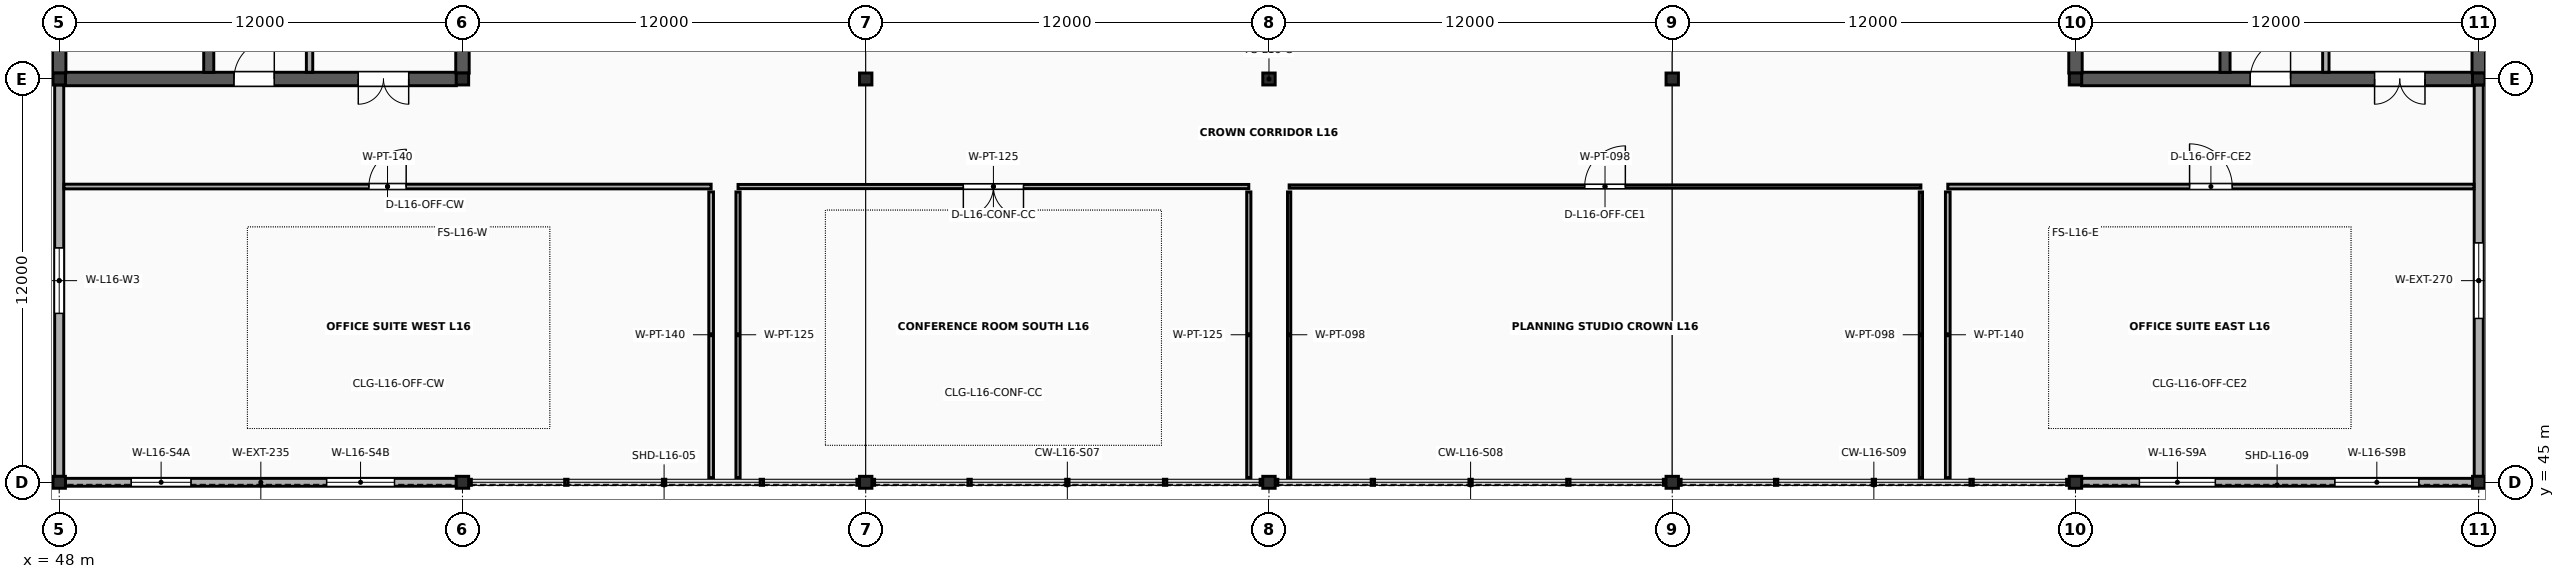
"""IFC4 building model, lengths in metres.
Left out: names, types, materials, properties, quantities, classifications, styles, units other than length and angle.
Written with IfcOpenShell. Run it as: python <this file> out.ifc"""

import sys

from ifc_helpers import new_model, si_unit, direction, frame, frame_2d, origin, origin_2d, place, context, subcontext, project, spatial, rectangle, i_section, extrude, element, fill, save


model = new_model("IFC4")
c1 = context("Model", 3, precision=1e-05, world=origin(), true_north=direction((0.0, 1.0)))
c2 = subcontext(c1, "Body", "Model", "MODEL_VIEW")
j1 = project(units=[si_unit("LENGTHUNIT", "METRE"), si_unit("PLANEANGLEUNIT", "RADIAN")], contexts=[c1])
p1 = place(None, origin())
s1 = spatial("IfcSite", under=j1, at=p1, CompositionType="ELEMENT")
p2 = place(p1, origin())
s2 = spatial("IfcBuilding", under=s1, at=p2, CompositionType="ELEMENT")
p3 = place(p2, frame((0.0, 0.0, 65.6)))
s3 = spatial("IfcBuildingStorey", under=s2, at=p3, CompositionType="ELEMENT", Elevation=65.6)
for number, where, z_axis, x_axis in (
    (1, (48.0, 45.0, 0.0), (0.0, 0.0, 1.0), (1.0, 0.0, 0.0)),
    (2, (48.0, 57.0, 0.0), (0.0, 0.0, 1.0), (1.0, 0.0, 0.0)),
    (3, (60.0, 45.0, 0.0), (0.0, 0.0, 1.0), (1.0, 0.0, 0.0)),
    (4, (60.0, 57.0, 0.0), (0.0, 0.0, 1.0), (1.0, 0.0, 0.0)),
    (5, (72.0, 45.0, 0.0), (0.0, 0.0, 1.0), (1.0, 0.0, 0.0)),
    (6, (72.0, 57.0, 0.0), (0.0, 0.0, 1.0), (1.0, 0.0, 0.0)),
    (7, (84.0, 45.0, 0.0), (0.0, 0.0, 1.0), (1.0, 0.0, 0.0)),
    (8, (84.0, 57.0, 0.0), (0.0, 0.0, 1.0), (1.0, 0.0, 0.0)),
    (9, (96.0, 45.0, 0.0), (0.0, 0.0, 1.0), (1.0, 0.0, 0.0)),
    (10, (96.0, 57.0, 0.0), (0.0, 0.0, 1.0), (1.0, 0.0, 0.0)),
    (11, (108.0, 45.0, 0.0), (0.0, 0.0, 1.0), (1.0, 0.0, 0.0)),
    (12, (108.0, 57.0, 0.0), (0.0, 0.0, 1.0), (1.0, 0.0, 0.0)),
    (13, (120.0, 45.0, 0.0), (0.0, 0.0, 1.0), (1.0, 0.0, 0.0)),
    (14, (120.0, 57.0, 0.0), (0.0, 0.0, 1.0), (1.0, 0.0, 0.0)),
):
    element("IfcColumn", number, at=place(p3, frame(where, z_axis=z_axis, x_axis=x_axis)), inside=s3, PredefinedType="COLUMN", context=c2, shape_type="SweptSolid", body=[
        extrude(i_section(OverallWidth=0.369, OverallDepth=0.356, WebThickness=0.011, FlangeThickness=0.018, FilletRadius=0.018, at=origin_2d()), origin(), (0.0, 0.0, 1.0), 4.0),
    ])
p4 = place(p3, frame((48.181, 57.0, 0.0), z_axis=(0.0, 0.0, 1.0), x_axis=(1.0, 0.0, 0.0)))
e15 = element("IfcWall", 15, at=p4, inside=s3, PredefinedType="SHEAR", context=c2, shape_type="SweptSolid", body=[
    extrude(rectangle(XDim=11.637, YDim=0.4, at=frame_2d((5.819, 0.0))), origin(), (0.0, 0.0, 1.0), 3.793),
])
p5 = place(p4, frame((5.019, 0.0, 0.0)))
e16 = element("IfcOpeningElement", 16, at=p5, cuts=e15, PredefinedType="OPENING", context=c2, shape_type="SweptSolid", body=[
    extrude(rectangle(XDim=1.2, YDim=2.2, at=frame_2d((0.6, 1.1))), frame((0.0, 0.215, 0.0), z_axis=(0.0, -1.0, 0.0), x_axis=(1.0, 0.0, 0.0)), (0.0, 0.0, 1.0), 0.43),
])
p6 = place(p4, frame((8.718, 0.0, 0.0)))
e17 = element("IfcOpeningElement", 17, at=p6, cuts=e15, PredefinedType="OPENING", context=c2, shape_type="SweptSolid", body=[
    extrude(rectangle(XDim=1.5, YDim=2.25, at=frame_2d((0.75, 1.125))), frame((0.0, 0.215, 0.0), z_axis=(0.0, -1.0, 0.0), x_axis=(1.0, 0.0, 0.0)), (0.0, 0.0, 1.0), 0.43),
])
for number, where, z_axis, x_axis in (
    (18, (48.0, 57.175, 0.0), (0.0, 0.0, 1.0), (0.0, 1.0, 0.0)),
    (19, (60.0, 57.175, 0.0), (0.0, 0.0, 1.0), (0.0, 1.0, 0.0)),
):
    element("IfcWall", number, at=place(p3, frame(where, z_axis=z_axis, x_axis=x_axis)), inside=s3, PredefinedType="SHEAR", context=c2, shape_type="SweptSolid", body=[
        extrude(rectangle(XDim=11.65, YDim=0.4, at=frame_2d((5.825, 0.0))), origin(), (0.0, 0.0, 1.0), 3.793),
    ])
p7 = place(p3, frame((52.45, 57.197, 0.0), z_axis=(0.0, 0.0, 1.0), x_axis=(0.0, 1.0, 0.0)))
e20 = element("IfcWall", 20, at=p7, inside=s3, PredefinedType="SHEAR", context=c2, shape_type="SweptSolid", body=[
    extrude(rectangle(XDim=11.606, YDim=0.3, at=frame_2d((5.803, 0.0))), origin(), (0.0, 0.0, 1.0), 3.793),
])
p8 = place(p7, frame((0.9, 0.0, 0.0)))
e21 = element("IfcOpeningElement", 21, at=p8, cuts=e20, PredefinedType="OPENING", context=c2, shape_type="SweptSolid", body=[
    extrude(rectangle(XDim=1.1, YDim=2.2, at=frame_2d((0.55, 1.1))), frame((0.0, 0.165, 0.0), z_axis=(0.0, -1.0, 0.0), x_axis=(1.0, 0.0, 0.0)), (0.0, 0.0, 1.0), 0.33),
])
p9 = place(p3, frame((55.45, 57.2, 0.0), z_axis=(0.0, 0.0, 1.0), x_axis=(0.0, 1.0, 0.0)))
e22 = element("IfcWall", 22, at=p9, inside=s3, PredefinedType="SOLIDWALL", context=c2, shape_type="SweptSolid", body=[
    extrude(rectangle(XDim=8.48, YDim=0.19, at=frame_2d((4.24, 0.0))), origin(), (0.0, 0.0, 1.0), 3.783),
])
p10 = place(p9, frame((3.6, 0.0, 0.0)))
e23 = element("IfcOpeningElement", 23, at=p10, cuts=e22, PredefinedType="OPENING", context=c2, shape_type="SweptSolid", body=[
    extrude(rectangle(XDim=1.04, YDim=2.18, at=frame_2d((0.52, 1.09))), frame((0.0, 0.11, 0.0), z_axis=(0.0, -1.0, 0.0), x_axis=(1.0, 0.0, 0.0)), (0.0, 0.0, 1.0), 0.22),
])
p11 = place(p3, frame((108.181, 57.0, 0.0), z_axis=(0.0, 0.0, 1.0), x_axis=(1.0, 0.0, 0.0)))
e24 = element("IfcWall", 24, at=p11, inside=s3, PredefinedType="SHEAR", context=c2, shape_type="SweptSolid", body=[
    extrude(rectangle(XDim=11.637, YDim=0.4, at=frame_2d((5.819, 0.0))), origin(), (0.0, 0.0, 1.0), 3.793),
])
p12 = place(p11, frame((5.019, 0.0, 0.0)))
e25 = element("IfcOpeningElement", 25, at=p12, cuts=e24, PredefinedType="OPENING", context=c2, shape_type="SweptSolid", body=[
    extrude(rectangle(XDim=1.2, YDim=2.2, at=frame_2d((0.6, 1.1))), frame((0.0, 0.215, 0.0), z_axis=(0.0, -1.0, 0.0), x_axis=(1.0, 0.0, 0.0)), (0.0, 0.0, 1.0), 0.43),
])
p13 = place(p11, frame((8.719, 0.0, 0.0)))
e26 = element("IfcOpeningElement", 26, at=p13, cuts=e24, PredefinedType="OPENING", context=c2, shape_type="SweptSolid", body=[
    extrude(rectangle(XDim=1.5, YDim=2.25, at=frame_2d((0.75, 1.125))), frame((0.0, 0.215, 0.0), z_axis=(0.0, -1.0, 0.0), x_axis=(1.0, 0.0, 0.0)), (0.0, 0.0, 1.0), 0.43),
])
for number, where, z_axis, x_axis in (
    (27, (108.0, 57.175, 0.0), (0.0, 0.0, 1.0), (0.0, 1.0, 0.0)),
    (28, (120.0, 57.175, 0.0), (0.0, 0.0, 1.0), (0.0, 1.0, 0.0)),
):
    element("IfcWall", number, at=place(p3, frame(where, z_axis=z_axis, x_axis=x_axis)), inside=s3, PredefinedType="SHEAR", context=c2, shape_type="SweptSolid", body=[
        extrude(rectangle(XDim=11.65, YDim=0.4, at=frame_2d((5.825, 0.0))), origin(), (0.0, 0.0, 1.0), 3.793),
    ])
p14 = place(p3, frame((112.45, 57.197, 0.0), z_axis=(0.0, 0.0, 1.0), x_axis=(0.0, 1.0, 0.0)))
e29 = element("IfcWall", 29, at=p14, inside=s3, PredefinedType="SHEAR", context=c2, shape_type="SweptSolid", body=[
    extrude(rectangle(XDim=11.606, YDim=0.3, at=frame_2d((5.803, 0.0))), origin(), (0.0, 0.0, 1.0), 3.793),
])
p15 = place(p14, frame((0.9, 0.0, 0.0)))
e30 = element("IfcOpeningElement", 30, at=p15, cuts=e29, PredefinedType="OPENING", context=c2, shape_type="SweptSolid", body=[
    extrude(rectangle(XDim=1.1, YDim=2.2, at=frame_2d((0.55, 1.1))), frame((0.0, 0.165, 0.0), z_axis=(0.0, -1.0, 0.0), x_axis=(1.0, 0.0, 0.0)), (0.0, 0.0, 1.0), 0.33),
])
p16 = place(p3, frame((115.45, 57.2, 0.0), z_axis=(0.0, 0.0, 1.0), x_axis=(0.0, 1.0, 0.0)))
e31 = element("IfcWall", 31, at=p16, inside=s3, PredefinedType="SOLIDWALL", context=c2, shape_type="SweptSolid", body=[
    extrude(rectangle(XDim=8.48, YDim=0.19, at=frame_2d((4.24, 0.0))), origin(), (0.0, 0.0, 1.0), 3.783),
])
p17 = place(p16, frame((3.6, 0.0, 0.0)))
e32 = element("IfcOpeningElement", 32, at=p17, cuts=e31, PredefinedType="OPENING", context=c2, shape_type="SweptSolid", body=[
    extrude(rectangle(XDim=1.04, YDim=2.18, at=frame_2d((0.52, 1.09))), frame((0.0, 0.11, 0.0), z_axis=(0.0, -1.0, 0.0), x_axis=(1.0, 0.0, 0.0)), (0.0, 0.0, 1.0), 0.22),
])
p18 = place(p3, frame((48.183, 45.0, 0.0), z_axis=(0.0, 0.0, 1.0), x_axis=(1.0, 0.0, 0.0)))
e33 = element("IfcWall", 33, at=p18, inside=s3, PredefinedType="SOLIDWALL", context=c2, shape_type="SweptSolid", body=[
    extrude(rectangle(XDim=11.635, YDim=0.235, at=frame_2d((5.817, 0.0))), origin(), (0.0, 0.0, 1.0), 3.246),
])
p19 = place(p18, frame((1.96, 0.0, 0.78)))
e34 = element("IfcOpeningElement", 34, at=p19, cuts=e33, PredefinedType="OPENING", context=c2, shape_type="SweptSolid", body=[
    extrude(rectangle(XDim=1.78, YDim=1.9, at=frame_2d((0.89, 0.95))), frame((0.0, 0.133, 0.0), z_axis=(0.0, -1.0, 0.0), x_axis=(1.0, 0.0, 0.0)), (0.0, 0.0, 1.0), 0.265),
])
p20 = place(p18, frame((7.775, 0.0, 0.78)))
e35 = element("IfcOpeningElement", 35, at=p20, cuts=e33, PredefinedType="OPENING", context=c2, shape_type="SweptSolid", body=[
    extrude(rectangle(XDim=2.02, YDim=1.9, at=frame_2d((1.01, 0.95))), frame((0.0, 0.133, 0.0), z_axis=(0.0, -1.0, 0.0), x_axis=(1.0, 0.0, 0.0)), (0.0, 0.0, 1.0), 0.265),
])
p21 = place(p3, frame((108.183, 45.0, 0.0), z_axis=(0.0, 0.0, 1.0), x_axis=(1.0, 0.0, 0.0)))
e36 = element("IfcWall", 36, at=p21, inside=s3, PredefinedType="SOLIDWALL", context=c2, shape_type="SweptSolid", body=[
    extrude(rectangle(XDim=11.635, YDim=0.235, at=frame_2d((5.817, 0.0))), origin(), (0.0, 0.0, 1.0), 3.246),
])
p22 = place(p21, frame((1.72, 0.0, 0.78)))
e37 = element("IfcOpeningElement", 37, at=p22, cuts=e36, PredefinedType="OPENING", context=c2, shape_type="SweptSolid", body=[
    extrude(rectangle(XDim=2.26, YDim=1.9, at=frame_2d((1.13, 0.95))), frame((0.0, 0.133, 0.0), z_axis=(0.0, -1.0, 0.0), x_axis=(1.0, 0.0, 0.0)), (0.0, 0.0, 1.0), 0.265),
])
p23 = place(p21, frame((7.535, 0.0, 0.78)))
e38 = element("IfcOpeningElement", 38, at=p23, cuts=e36, PredefinedType="OPENING", context=c2, shape_type="SweptSolid", body=[
    extrude(rectangle(XDim=2.5, YDim=1.9, at=frame_2d((1.25, 0.95))), frame((0.0, 0.133, 0.0), z_axis=(0.0, -1.0, 0.0), x_axis=(1.0, 0.0, 0.0)), (0.0, 0.0, 1.0), 0.265),
])
p24 = place(p3, frame((48.0, 45.176, 0.0), z_axis=(0.0, 0.0, 1.0), x_axis=(0.0, 1.0, 0.0)))
e39 = element("IfcWall", 39, at=p24, inside=s3, PredefinedType="SOLIDWALL", context=c2, shape_type="SweptSolid", body=[
    extrude(rectangle(XDim=11.648, YDim=0.27, at=frame_2d((5.824, 0.0))), origin(), (0.0, 0.0, 1.0), 3.246),
])
p25 = place(p24, frame((4.849, 0.0, 1.4)))
e40 = element("IfcOpeningElement", 40, at=p25, cuts=e39, PredefinedType="OPENING", context=c2, shape_type="SweptSolid", body=[
    extrude(rectangle(XDim=1.95, YDim=0.88, at=frame_2d((0.975, 0.44))), frame((0.0, 0.15, 0.0), z_axis=(0.0, -1.0, 0.0), x_axis=(1.0, 0.0, 0.0)), (0.0, 0.0, 1.0), 0.3),
])
p26 = place(p3, frame((120.0, 45.176, 0.0), z_axis=(0.0, 0.0, 1.0), x_axis=(0.0, 1.0, 0.0)))
e41 = element("IfcWall", 41, at=p26, inside=s3, PredefinedType="SOLIDWALL", context=c2, shape_type="SweptSolid", body=[
    extrude(rectangle(XDim=11.648, YDim=0.27, at=frame_2d((5.824, 0.0))), origin(), (0.0, 0.0, 1.0), 3.246),
])
p27 = place(p26, frame((4.699, 0.0, 1.4)))
e42 = element("IfcOpeningElement", 42, at=p27, cuts=e41, PredefinedType="OPENING", context=c2, shape_type="SweptSolid", body=[
    extrude(rectangle(XDim=2.25, YDim=0.88, at=frame_2d((1.125, 0.44))), frame((0.0, 0.15, 0.0), z_axis=(0.0, -1.0, 0.0), x_axis=(1.0, 0.0, 0.0)), (0.0, 0.0, 1.0), 0.3),
])
p28 = place(p3, frame((48.14, 53.8, 0.0), z_axis=(0.0, 0.0, 1.0), x_axis=(1.0, 0.0, 0.0)))
e43 = element("IfcWall", 43, at=p28, inside=s3, PredefinedType="PARTITIONING", context=c2, shape_type="SweptSolid", body=[
    extrude(rectangle(XDim=19.26, YDim=0.14, at=frame_2d((9.63, 0.0))), origin(), (0.0, 0.0, 1.0), 2.88),
])
p29 = place(p28, frame((9.075, 0.0, 0.0)))
e44 = element("IfcOpeningElement", 44, at=p29, cuts=e43, PredefinedType="OPENING", context=c2, shape_type="SweptSolid", body=[
    extrude(rectangle(XDim=1.11, YDim=2.21, at=frame_2d((0.555, 1.105))), frame((0.0, 0.085, 0.0), z_axis=(0.0, -1.0, 0.0), x_axis=(1.0, 0.0, 0.0)), (0.0, 0.0, 1.0), 0.17),
])
p30 = place(p3, frame((67.4, 45.14, 0.0), z_axis=(0.0, 0.0, 1.0), x_axis=(0.0, 1.0, 0.0)))
e45 = element("IfcWall", 45, at=p30, inside=s3, PredefinedType="PARTITIONING", context=c2, shape_type="SweptSolid", body=[
    extrude(rectangle(XDim=8.5, YDim=0.14, at=frame_2d((4.25, 0.0))), origin(), (0.0, 0.0, 1.0), 2.88),
])
p31 = place(p3, frame((68.2, 53.8, 0.0), z_axis=(0.0, 0.0, 1.0), x_axis=(1.0, 0.0, 0.0)))
e46 = element("IfcWall", 46, at=p31, inside=s3, PredefinedType="PARTITIONING", context=c2, shape_type="SweptSolid", body=[
    extrude(rectangle(XDim=15.2, YDim=0.125, at=frame_2d((7.6, 0.0))), origin(), (0.0, 0.0, 1.0), 2.88),
])
p32 = place(p31, frame((6.705, 0.0, 0.0)))
e47 = element("IfcOpeningElement", 47, at=p32, cuts=e46, PredefinedType="OPENING", context=c2, shape_type="SweptSolid", body=[
    extrude(rectangle(XDim=1.79, YDim=2.39, at=frame_2d((0.895, 1.195))), frame((0.0, 0.077, 0.0), z_axis=(0.0, -1.0, 0.0), x_axis=(1.0, 0.0, 0.0)), (0.0, 0.0, 1.0), 0.155),
])
for number, where, z_axis, x_axis in (
    (48, (68.2, 45.14, 0.0), (0.0, 0.0, 1.0), (0.0, 1.0, 0.0)),
    (49, (83.4, 45.14, 0.0), (0.0, 0.0, 1.0), (0.0, 1.0, 0.0)),
):
    element("IfcWall", number, at=place(p3, frame(where, z_axis=z_axis, x_axis=x_axis)), inside=s3, PredefinedType="PARTITIONING", context=c2, shape_type="SweptSolid", body=[
        extrude(rectangle(XDim=8.5, YDim=0.125, at=frame_2d((4.25, 0.0))), origin(), (0.0, 0.0, 1.0), 2.88),
    ])
p33 = place(p3, frame((84.6, 53.8, 0.0), z_axis=(0.0, 0.0, 1.0), x_axis=(1.0, 0.0, 0.0)))
e50 = element("IfcWall", 50, at=p33, inside=s3, PredefinedType="PARTITIONING", context=c2, shape_type="SweptSolid", body=[
    extrude(rectangle(XDim=18.8, YDim=0.098, at=frame_2d((9.4, 0.0))), origin(), (0.0, 0.0, 1.0), 2.88),
])
p34 = place(p33, frame((8.795, 0.0, 0.0)))
e51 = element("IfcOpeningElement", 51, at=p34, cuts=e50, PredefinedType="OPENING", context=c2, shape_type="SweptSolid", body=[
    extrude(rectangle(XDim=1.21, YDim=2.25, at=frame_2d((0.605, 1.125))), frame((0.0, 0.064, 0.0), z_axis=(0.0, -1.0, 0.0), x_axis=(1.0, 0.0, 0.0)), (0.0, 0.0, 1.0), 0.128),
])
for number, where, z_axis, x_axis in (
    (52, (84.6, 45.14, 0.0), (0.0, 0.0, 1.0), (0.0, 1.0, 0.0)),
    (53, (103.4, 45.14, 0.0), (0.0, 0.0, 1.0), (0.0, 1.0, 0.0)),
):
    element("IfcWall", number, at=place(p3, frame(where, z_axis=z_axis, x_axis=x_axis)), inside=s3, PredefinedType="PARTITIONING", context=c2, shape_type="SweptSolid", body=[
        extrude(rectangle(XDim=8.5, YDim=0.098, at=frame_2d((4.25, 0.0))), origin(), (0.0, 0.0, 1.0), 2.88),
    ])
p35 = place(p3, frame((104.2, 53.8, 0.0), z_axis=(0.0, 0.0, 1.0), x_axis=(1.0, 0.0, 0.0)))
e54 = element("IfcWall", 54, at=p35, inside=s3, PredefinedType="PARTITIONING", context=c2, shape_type="SweptSolid", body=[
    extrude(rectangle(XDim=15.66, YDim=0.14, at=frame_2d((7.83, 0.0))), origin(), (0.0, 0.0, 1.0), 2.88),
])
p36 = place(p35, frame((7.195, 0.0, 0.0)))
e55 = element("IfcOpeningElement", 55, at=p36, cuts=e54, PredefinedType="OPENING", context=c2, shape_type="SweptSolid", body=[
    extrude(rectangle(XDim=1.27, YDim=2.27, at=frame_2d((0.635, 1.135))), frame((0.0, 0.085, 0.0), z_axis=(0.0, -1.0, 0.0), x_axis=(1.0, 0.0, 0.0)), (0.0, 0.0, 1.0), 0.17),
])
p37 = place(p3, frame((104.2, 45.14, 0.0), z_axis=(0.0, 0.0, 1.0), x_axis=(0.0, 1.0, 0.0)))
e56 = element("IfcWall", 56, at=p37, inside=s3, PredefinedType="PARTITIONING", context=c2, shape_type="SweptSolid", body=[
    extrude(rectangle(XDim=8.5, YDim=0.14, at=frame_2d((4.25, 0.0))), origin(), (0.0, 0.0, 1.0), 2.88),
])
p38 = place(p19, origin())
e57 = element("IfcWindow", 57, at=p38, inside=s3, PartitioningType="SINGLE_PANEL", PredefinedType="WINDOW", context=c2, shape_type="SweptSolid", body=[
    extrude(rectangle(XDim=1.78, YDim=1.9, at=frame_2d((0.89, 0.95))), frame((0.0, 0.03, 0.0), z_axis=(0.0, -1.0, 0.0), x_axis=(1.0, 0.0, 0.0)), (0.0, 0.0, 1.0), 0.06),
])
fill(e34, e57)
p39 = place(p20, origin())
e58 = element("IfcWindow", 58, at=p39, inside=s3, PartitioningType="DOUBLE_PANEL_VERTICAL", PredefinedType="WINDOW", context=c2, shape_type="SweptSolid", body=[
    extrude(rectangle(XDim=2.02, YDim=1.9, at=frame_2d((1.01, 0.95))), frame((0.0, 0.03, 0.0), z_axis=(0.0, -1.0, 0.0), x_axis=(1.0, 0.0, 0.0)), (0.0, 0.0, 1.0), 0.06),
])
fill(e35, e58)
p40 = place(p22, origin())
e59 = element("IfcWindow", 59, at=p40, inside=s3, PartitioningType="DOUBLE_PANEL_VERTICAL", PredefinedType="WINDOW", context=c2, shape_type="SweptSolid", body=[
    extrude(rectangle(XDim=2.26, YDim=1.9, at=frame_2d((1.13, 0.95))), frame((0.0, 0.03, 0.0), z_axis=(0.0, -1.0, 0.0), x_axis=(1.0, 0.0, 0.0)), (0.0, 0.0, 1.0), 0.06),
])
fill(e37, e59)
p41 = place(p23, origin())
e60 = element("IfcWindow", 60, at=p41, inside=s3, PartitioningType="DOUBLE_PANEL_VERTICAL", PredefinedType="WINDOW", context=c2, shape_type="SweptSolid", body=[
    extrude(rectangle(XDim=2.5, YDim=1.9, at=frame_2d((1.25, 0.95))), frame((0.0, 0.03, 0.0), z_axis=(0.0, -1.0, 0.0), x_axis=(1.0, 0.0, 0.0)), (0.0, 0.0, 1.0), 0.06),
])
fill(e38, e60)
p42 = place(p25, origin())
e61 = element("IfcWindow", 61, at=p42, inside=s3, PartitioningType="DOUBLE_PANEL_VERTICAL", PredefinedType="USERDEFINED", context=c2, shape_type="SweptSolid", body=[
    extrude(rectangle(XDim=1.95, YDim=0.88, at=frame_2d((0.975, 0.44))), frame((0.0, 0.03, 0.0), z_axis=(0.0, -1.0, 0.0), x_axis=(1.0, 0.0, 0.0)), (0.0, 0.0, 1.0), 0.06),
])
fill(e40, e61)
p43 = place(p27, origin())
e62 = element("IfcWindow", 62, at=p43, inside=s3, PartitioningType="DOUBLE_PANEL_VERTICAL", PredefinedType="USERDEFINED", context=c2, shape_type="SweptSolid", body=[
    extrude(rectangle(XDim=2.25, YDim=0.88, at=frame_2d((1.125, 0.44))), frame((0.0, 0.03, 0.0), z_axis=(0.0, -1.0, 0.0), x_axis=(1.0, 0.0, 0.0)), (0.0, 0.0, 1.0), 0.06),
])
fill(e42, e62)
p44 = place(p5, origin())
e63 = element("IfcDoor", 63, at=p44, inside=s3, OperationType="SINGLE_SWING_RIGHT", PredefinedType="DOOR", context=c2, shape_type="SweptSolid", body=[
    extrude(rectangle(XDim=1.2, YDim=2.2, at=frame_2d((0.6, 1.1))), frame((0.0, 0.025, 0.0), z_axis=(0.0, -1.0, 0.0), x_axis=(1.0, 0.0, 0.0)), (0.0, 0.0, 1.0), 0.05),
])
fill(e16, e63)
p45 = place(p6, origin())
e64 = element("IfcDoor", 64, at=p45, inside=s3, OperationType="DOUBLE_DOOR_SINGLE_SWING", PredefinedType="DOOR", context=c2, shape_type="SweptSolid", body=[
    extrude(rectangle(XDim=1.5, YDim=2.25, at=frame_2d((0.75, 1.125))), frame((0.0, 0.025, 0.0), z_axis=(0.0, -1.0, 0.0), x_axis=(1.0, 0.0, 0.0)), (0.0, 0.0, 1.0), 0.05),
])
fill(e17, e64)
p46 = place(p12, origin())
e65 = element("IfcDoor", 65, at=p46, inside=s3, OperationType="SINGLE_SWING_RIGHT", PredefinedType="DOOR", context=c2, shape_type="SweptSolid", body=[
    extrude(rectangle(XDim=1.2, YDim=2.2, at=frame_2d((0.6, 1.1))), frame((0.0, 0.025, 0.0), z_axis=(0.0, -1.0, 0.0), x_axis=(1.0, 0.0, 0.0)), (0.0, 0.0, 1.0), 0.05),
])
fill(e25, e65)
p47 = place(p13, origin())
e66 = element("IfcDoor", 66, at=p47, inside=s3, OperationType="DOUBLE_DOOR_SINGLE_SWING", PredefinedType="DOOR", context=c2, shape_type="SweptSolid", body=[
    extrude(rectangle(XDim=1.5, YDim=2.25, at=frame_2d((0.75, 1.125))), frame((0.0, 0.025, 0.0), z_axis=(0.0, -1.0, 0.0), x_axis=(1.0, 0.0, 0.0)), (0.0, 0.0, 1.0), 0.05),
])
fill(e26, e66)
p48 = place(p29, origin())
e67 = element("IfcDoor", 67, at=p48, inside=s3, OperationType="SINGLE_SWING_RIGHT", PredefinedType="DOOR", context=c2, shape_type="SweptSolid", body=[
    extrude(rectangle(XDim=1.11, YDim=2.21, at=frame_2d((0.555, 1.105))), frame((0.0, 0.025, 0.0), z_axis=(0.0, -1.0, 0.0), x_axis=(1.0, 0.0, 0.0)), (0.0, 0.0, 1.0), 0.05),
])
fill(e44, e67)
p49 = place(p32, origin())
e68 = element("IfcDoor", 68, at=p49, inside=s3, OperationType="DOUBLE_DOOR_SINGLE_SWING", PredefinedType="DOOR", context=c2, shape_type="SweptSolid", body=[
    extrude(rectangle(XDim=1.79, YDim=2.39, at=frame_2d((0.895, 1.195))), frame((0.0, 0.025, 0.0), z_axis=(0.0, -1.0, 0.0), x_axis=(1.0, 0.0, 0.0)), (0.0, 0.0, 1.0), 0.05),
])
fill(e47, e68)
p50 = place(p34, origin())
e69 = element("IfcDoor", 69, at=p50, inside=s3, OperationType="SINGLE_SWING_RIGHT", PredefinedType="DOOR", context=c2, shape_type="SweptSolid", body=[
    extrude(rectangle(XDim=1.21, YDim=2.25, at=frame_2d((0.605, 1.125))), frame((0.0, 0.025, 0.0), z_axis=(0.0, -1.0, 0.0), x_axis=(1.0, 0.0, 0.0)), (0.0, 0.0, 1.0), 0.05),
])
fill(e51, e69)
p51 = place(p36, origin())
e70 = element("IfcDoor", 70, at=p51, inside=s3, OperationType="SINGLE_SWING_LEFT", PredefinedType="DOOR", context=c2, shape_type="SweptSolid", body=[
    extrude(rectangle(XDim=1.27, YDim=2.27, at=frame_2d((0.635, 1.135))), frame((0.0, 0.025, 0.0), z_axis=(0.0, -1.0, 0.0), x_axis=(1.0, 0.0, 0.0)), (0.0, 0.0, 1.0), 0.05),
])
fill(e55, e70)
save(model, sys.argv[1])
